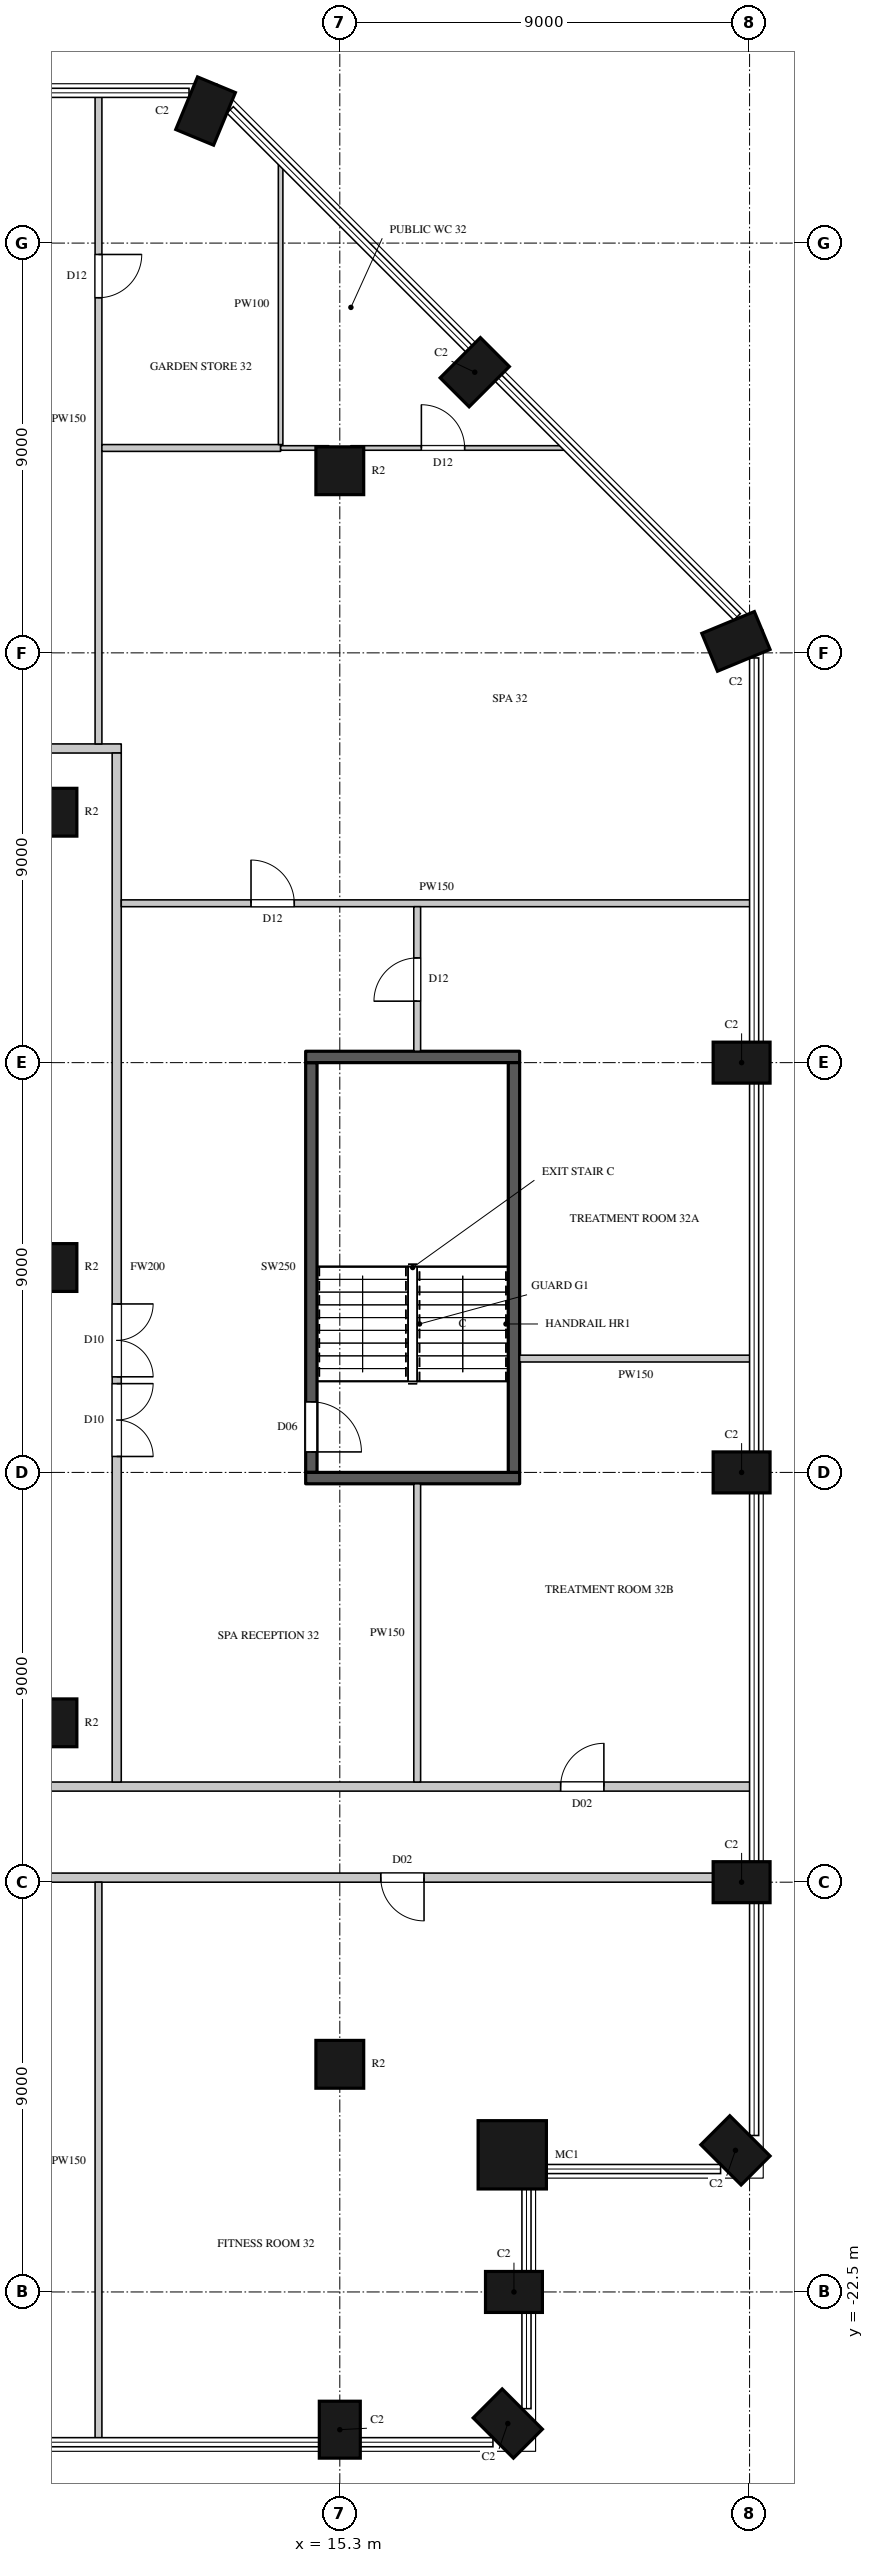
"""IFC4 building model, lengths in metres.
Left out: names, types, materials, properties, quantities, classifications, styles, units other than length and angle.
Written with IfcOpenShell. Run it as: python <this file> out.ifc"""

import sys

from ifc_helpers import new_model, si_unit, direction, frame, frame_2d, origin, origin_2d, place, context, subcontext, project, spatial, rectangle, circle, extrude, element, fill, save


model = new_model("IFC4")
c1 = context("Model", 3, precision=1e-05, world=origin(), true_north=direction((0.0, 1.0)))
c2 = subcontext(c1, "Body", "Model", "MODEL_VIEW")
j1 = project(units=[si_unit("LENGTHUNIT", "METRE"), si_unit("PLANEANGLEUNIT", "RADIAN")], contexts=[c1])
p1 = place(None, origin())
s1 = spatial("IfcSite", under=j1, at=p1, CompositionType="ELEMENT")
p2 = place(p1, origin())
s2 = spatial("IfcBuilding", under=s1, at=p2, CompositionType="ELEMENT")
p3 = place(p2, frame((0.0, 0.0, 145.5)))
s3 = spatial("IfcBuildingStorey", under=s2, at=p3, CompositionType="ELEMENT", Elevation=145.5)
for number, where, z_axis, x_axis in (
    (1, (15.3, -25.525, 0.0), (0.0, 0.0, 1.0), (1.0, 0.0, 0.0)),
    (2, (18.99, -25.39, 0.0), (0.0, 0.0, 1.0), (0.707, 0.707, 0.0)),
    (3, (19.125, -22.5, 0.0), (0.0, 0.0, 1.0), (0.0, 1.0, 0.0)),
):
    element("IfcColumn", number, at=place(p3, frame(where, z_axis=z_axis, x_axis=x_axis)), inside=s3, PredefinedType="COLUMN", context=c2, shape_type="SweptSolid", body=[
        extrude(rectangle(XDim=0.9, YDim=1.25, at=origin_2d()), origin(), (0.0, 0.0, 1.0), 7.0),
    ])
p4 = place(p3, frame((19.088, -19.488, 0.0), z_axis=(0.0, 0.0, 1.0), x_axis=(1.0, 0.0, 0.0)))
e4 = element("IfcColumn", 4, at=p4, inside=s3, PredefinedType="COLUMN", context=c2, shape_type="SweptSolid", body=[
    extrude(circle(Radius=0.75, at=origin_2d()), origin(), (0.0, 0.0, 1.0), 7.0),
])
for number, where, z_axis, x_axis in (
    (5, (23.99, -19.39, 0.0), (0.0, 0.0, 1.0), (0.707, 0.707, 0.0)),
    (6, (24.125, -13.5, 0.0), (0.0, 0.0, 1.0), (0.0, 1.0, 0.0)),
    (7, (24.125, -4.5, 0.0), (0.0, 0.0, 1.0), (0.0, 1.0, 0.0)),
    (8, (24.125, 4.5, 0.0), (0.0, 0.0, 1.0), (0.0, 1.0, 0.0)),
    (9, (24.0, 13.752, 0.0), (0.0, 0.0, 1.0), (-0.383, 0.924, 0.0)),
    (10, (18.264, 19.664, 0.0), (0.0, 0.0, 1.0), (-0.707, 0.707, 0.0)),
    (11, (12.352, 25.4, 0.0), (0.0, 0.0, 1.0), (-0.924, 0.383, 0.0)),
):
    element("IfcColumn", number, at=place(p3, frame(where, z_axis=z_axis, x_axis=x_axis)), inside=s3, PredefinedType="COLUMN", context=c2, shape_type="SweptSolid", body=[
        extrude(rectangle(XDim=0.9, YDim=1.25, at=origin_2d()), origin(), (0.0, 0.0, 1.0), 7.0),
    ])
for number, where, z_axis, x_axis in (
    (12, (15.3, -17.5, 0.0), (0.0, 0.0, 1.0), (1.0, 0.0, 0.0)),
    (13, (15.3, 17.5, 0.0), (0.0, 0.0, 1.0), (1.0, 0.0, 0.0)),
    (14, (9.0, -10.0, 0.0), (0.0, 0.0, 1.0), (1.0, 0.0, 0.0)),
    (15, (9.0, 0.0, 0.0), (0.0, 0.0, 1.0), (1.0, 0.0, 0.0)),
    (16, (9.0, 10.0, 0.0), (0.0, 0.0, 1.0), (1.0, 0.0, 0.0)),
):
    element("IfcColumn", number, at=place(p3, frame(where, z_axis=z_axis, x_axis=x_axis)), inside=s3, PredefinedType="COLUMN", context=c2, shape_type="SweptSolid", body=[
        extrude(circle(Radius=0.525, at=origin_2d()), origin(), (0.0, 0.0, 1.0), 7.0),
    ])
p5 = place(p3, frame((-8.3, -13.4, 0.0), z_axis=(0.0, 0.0, 1.0), x_axis=(1.0, 0.0, 0.0)))
e17 = element("IfcWall", 17, at=p5, inside=s3, PredefinedType="PARTITIONING", context=c2, shape_type="SweptSolid", body=[
    extrude(rectangle(XDim=31.8, YDim=0.2, at=frame_2d((15.9, 0.0))), origin(), (0.0, 0.0, 1.0), 6.7),
])
p6 = place(p5, frame((24.5, 0.0, 0.0)))
e18 = element("IfcOpeningElement", 18, at=p6, cuts=e17, PredefinedType="OPENING", context=c2, shape_type="SweptSolid", body=[
    extrude(rectangle(XDim=0.95, YDim=2.2, at=frame_2d((0.475, 1.1))), frame((0.0, 0.11, 0.0), z_axis=(0.0, -1.0, 0.0), x_axis=(1.0, 0.0, 0.0)), (0.0, 0.0, 1.0), 0.22),
])
p7 = place(p3, frame((-8.3, -11.4, 0.0), z_axis=(0.0, 0.0, 1.0), x_axis=(1.0, 0.0, 0.0)))
e19 = element("IfcWall", 19, at=p7, inside=s3, PredefinedType="PARTITIONING", context=c2, shape_type="SweptSolid", body=[
    extrude(rectangle(XDim=32.655, YDim=0.2, at=frame_2d((16.328, 0.0))), origin(), (0.0, 0.0, 1.0), 6.7),
])
p8 = place(p7, frame((9.6, 0.0, 0.0)))
e20 = element("IfcOpeningElement", 20, at=p8, cuts=e19, PredefinedType="OPENING", context=c2, shape_type="SweptSolid", body=[
    extrude(rectangle(XDim=1.5, YDim=2.2, at=frame_2d((0.75, 1.1))), frame((0.0, 0.11, 0.0), z_axis=(0.0, -1.0, 0.0), x_axis=(1.0, 0.0, 0.0)), (0.0, 0.0, 1.0), 0.22),
])
p9 = place(p7, frame((28.45, 0.0, 0.0)))
e21 = element("IfcOpeningElement", 21, at=p9, cuts=e19, PredefinedType="OPENING", context=c2, shape_type="SweptSolid", body=[
    extrude(rectangle(XDim=0.95, YDim=2.2, at=frame_2d((0.475, 1.1))), frame((0.0, 0.11, 0.0), z_axis=(0.0, -1.0, 0.0), x_axis=(1.0, 0.0, 0.0)), (0.0, 0.0, 1.0), 0.22),
])
p10 = place(p3, frame((-8.3, 11.4, 0.0), z_axis=(0.0, 0.0, 1.0), x_axis=(1.0, 0.0, 0.0)))
e22 = element("IfcWall", 22, at=p10, inside=s3, PredefinedType="PARTITIONING", context=c2, shape_type="SweptSolid", body=[
    extrude(rectangle(XDim=18.8, YDim=0.2, at=frame_2d((9.4, 0.0))), origin(), (0.0, 0.0, 1.0), 6.7),
])
p11 = place(p10, frame((7.4, 0.0, 0.0)))
e23 = element("IfcOpeningElement", 23, at=p11, cuts=e22, PredefinedType="OPENING", context=c2, shape_type="SweptSolid", body=[
    extrude(rectangle(XDim=1.6, YDim=2.4, at=frame_2d((0.8, 1.2))), frame((0.0, 0.11, 0.0), z_axis=(0.0, -1.0, 0.0), x_axis=(1.0, 0.0, 0.0)), (0.0, 0.0, 1.0), 0.22),
])
p12 = place(p3, frame((10.4, -11.3, 0.0), z_axis=(0.0, 0.0, 1.0), x_axis=(0.0, 1.0, 0.0)))
e24 = element("IfcWall", 24, at=p12, inside=s3, PredefinedType="PARTITIONING", context=c2, shape_type="SweptSolid", body=[
    extrude(rectangle(XDim=22.6, YDim=0.2, at=frame_2d((11.3, 0.0))), origin(), (0.0, 0.0, 1.0), 6.7),
])
p13 = place(p12, frame((8.9, 0.0, 0.0)))
e25 = element("IfcOpeningElement", 25, at=p13, cuts=e24, PredefinedType="OPENING", context=c2, shape_type="SweptSolid", body=[
    extrude(rectangle(XDim=1.6, YDim=2.4, at=frame_2d((0.8, 1.2))), frame((0.0, 0.11, 0.0), z_axis=(0.0, -1.0, 0.0), x_axis=(1.0, 0.0, 0.0)), (0.0, 0.0, 1.0), 0.22),
])
p14 = place(p12, frame((7.15, 0.0, 0.0)))
e26 = element("IfcOpeningElement", 26, at=p14, cuts=e24, PredefinedType="OPENING", context=c2, shape_type="SweptSolid", body=[
    extrude(rectangle(XDim=1.6, YDim=2.4, at=frame_2d((0.8, 1.2))), frame((0.0, 0.11, 0.0), z_axis=(0.0, -1.0, 0.0), x_axis=(1.0, 0.0, 0.0)), (0.0, 0.0, 1.0), 0.22),
])
p15 = place(p3, frame((10.0, -25.755, 0.0), z_axis=(0.0, 0.0, 1.0), x_axis=(0.0, 1.0, 0.0)))
e27 = element("IfcWall", 27, at=p15, inside=s3, PredefinedType="PARTITIONING", context=c2, shape_type="SweptSolid", body=[
    extrude(rectangle(XDim=12.255, YDim=0.15, at=frame_2d((6.127, 0.0))), origin(), (0.0, 0.0, 1.0), 6.7),
])
p16 = place(p3, frame((10.0, 11.5, 0.0), z_axis=(0.0, 0.0, 1.0), x_axis=(0.0, 1.0, 0.0)))
e28 = element("IfcWall", 28, at=p16, inside=s3, PredefinedType="PARTITIONING", context=c2, shape_type="SweptSolid", body=[
    extrude(rectangle(XDim=14.255, YDim=0.15, at=frame_2d((7.127, 0.0))), origin(), (0.0, 0.0, 1.0), 6.7),
])
p17 = place(p16, frame((9.8, 0.0, 0.0)))
e29 = element("IfcOpeningElement", 29, at=p17, cuts=e28, PredefinedType="OPENING", context=c2, shape_type="SweptSolid", body=[
    extrude(rectangle(XDim=0.95, YDim=2.2, at=frame_2d((0.475, 1.1))), frame((0.0, 0.085, 0.0), z_axis=(0.0, -1.0, 0.0), x_axis=(1.0, 0.0, 0.0)), (0.0, 0.0, 1.0), 0.17),
])
p18 = place(p3, frame((10.075, 18.0, 0.0), z_axis=(0.0, 0.0, 1.0), x_axis=(1.0, 0.0, 0.0)))
e30 = element("IfcWall", 30, at=p18, inside=s3, PredefinedType="PARTITIONING", context=c2, shape_type="SweptSolid", body=[
    extrude(rectangle(XDim=3.925, YDim=0.15, at=frame_2d((1.962, 0.0))), origin(), (0.0, 0.0, 1.0), 6.7),
])
p19 = place(p3, frame((10.5, 8.0, 0.0), z_axis=(0.0, 0.0, 1.0), x_axis=(1.0, 0.0, 0.0)))
e31 = element("IfcWall", 31, at=p19, inside=s3, PredefinedType="PARTITIONING", context=c2, shape_type="SweptSolid", body=[
    extrude(rectangle(XDim=13.855, YDim=0.15, at=frame_2d((6.927, 0.0))), origin(), (0.0, 0.0, 1.0), 6.7),
])
p20 = place(p19, frame((2.85, 0.0, 0.0)))
e32 = element("IfcOpeningElement", 32, at=p20, cuts=e31, PredefinedType="OPENING", context=c2, shape_type="SweptSolid", body=[
    extrude(rectangle(XDim=0.95, YDim=2.2, at=frame_2d((0.475, 1.1))), frame((0.0, 0.085, 0.0), z_axis=(0.0, -1.0, 0.0), x_axis=(1.0, 0.0, 0.0)), (0.0, 0.0, 1.0), 0.17),
])
p21 = place(p3, frame((17.0, -11.3, 0.0), z_axis=(0.0, 0.0, 1.0), x_axis=(0.0, 1.0, 0.0)))
e33 = element("IfcWall", 33, at=p21, inside=s3, PredefinedType="PARTITIONING", context=c2, shape_type="SweptSolid", body=[
    extrude(rectangle(XDim=6.55, YDim=0.15, at=frame_2d((3.275, 0.0))), origin(), (0.0, 0.0, 1.0), 6.7),
])
p22 = place(p3, frame((17.0, 4.75, 0.0), z_axis=(0.0, 0.0, 1.0), x_axis=(0.0, 1.0, 0.0)))
e34 = element("IfcWall", 34, at=p22, inside=s3, PredefinedType="PARTITIONING", context=c2, shape_type="SweptSolid", body=[
    extrude(rectangle(XDim=3.175, YDim=0.15, at=frame_2d((1.587, 0.0))), origin(), (0.0, 0.0, 1.0), 6.7),
])
p23 = place(p22, frame((1.1, 0.0, 0.0)))
e35 = element("IfcOpeningElement", 35, at=p23, cuts=e34, PredefinedType="OPENING", context=c2, shape_type="SweptSolid", body=[
    extrude(rectangle(XDim=0.95, YDim=2.2, at=frame_2d((0.475, 1.1))), frame((0.0, 0.085, 0.0), z_axis=(0.0, -1.0, 0.0), x_axis=(1.0, 0.0, 0.0)), (0.0, 0.0, 1.0), 0.17),
])
p24 = place(p3, frame((19.25, -2.0, 0.0), z_axis=(0.0, 0.0, 1.0), x_axis=(1.0, 0.0, 0.0)))
e36 = element("IfcWall", 36, at=p24, inside=s3, PredefinedType="PARTITIONING", context=c2, shape_type="SweptSolid", body=[
    extrude(rectangle(XDim=5.105, YDim=0.15, at=frame_2d((2.552, 0.0))), origin(), (0.0, 0.0, 1.0), 6.7),
])
p25 = place(p3, frame((14.675, -4.5, 0.0), z_axis=(0.0, 0.0, 1.0), x_axis=(0.0, 1.0, 0.0)))
e37 = element("IfcWall", 37, at=p25, inside=s3, PredefinedType="SHEAR", context=c2, shape_type="SweptSolid", body=[
    extrude(rectangle(XDim=9.0, YDim=0.25, at=frame_2d((4.5, 0.0))), origin(), (0.0, 0.0, 1.0), 6.7),
])
p26 = place(p25, frame((0.45, 0.0, 0.0)))
e38 = element("IfcOpeningElement", 38, at=p26, cuts=e37, PredefinedType="OPENING", context=c2, shape_type="SweptSolid", body=[
    extrude(rectangle(XDim=1.1, YDim=2.2, at=frame_2d((0.55, 1.1))), frame((0.0, 0.135, 0.0), z_axis=(0.0, -1.0, 0.0), x_axis=(1.0, 0.0, 0.0)), (0.0, 0.0, 1.0), 0.27),
])
for number, where, z_axis, x_axis in (
    (39, (14.55, -4.625, 0.0), (0.0, 0.0, 1.0), (1.0, 0.0, 0.0)),
    (40, (14.55, 4.625, 0.0), (0.0, 0.0, 1.0), (1.0, 0.0, 0.0)),
):
    element("IfcWall", number, at=place(p3, frame(where, z_axis=z_axis, x_axis=x_axis)), inside=s3, PredefinedType="SHEAR", context=c2, shape_type="SweptSolid", body=[
        extrude(rectangle(XDim=4.7, YDim=0.25, at=frame_2d((2.35, 0.0))), origin(), (0.0, 0.0, 1.0), 6.7),
    ])
p27 = place(p3, frame((19.125, -4.5, 0.0), z_axis=(0.0, 0.0, 1.0), x_axis=(0.0, 1.0, 0.0)))
e41 = element("IfcWall", 41, at=p27, inside=s3, PredefinedType="SHEAR", context=c2, shape_type="SweptSolid", body=[
    extrude(rectangle(XDim=9.0, YDim=0.25, at=frame_2d((4.5, 0.0))), origin(), (0.0, 0.0, 1.0), 6.7),
])
p28 = place(p3, frame((14.0, 18.0, 0.0), z_axis=(0.0, 0.0, 1.0), x_axis=(1.0, 0.0, 0.0)))
e42 = element("IfcWall", 42, at=p28, inside=s3, PredefinedType="PARTITIONING", context=c2, shape_type="SweptSolid", body=[
    extrude(rectangle(XDim=1.058, YDim=0.1, at=frame_2d((0.529, 0.0))), origin(), (0.0, 0.0, 1.0), 6.7),
])
p29 = place(p3, frame((15.542, 18.0, 0.0), z_axis=(0.0, 0.0, 1.0), x_axis=(1.0, 0.0, 0.0)))
e43 = element("IfcWall", 43, at=p29, inside=s3, PredefinedType="PARTITIONING", context=c2, shape_type="SweptSolid", body=[
    extrude(rectangle(XDim=4.712, YDim=0.1, at=frame_2d((2.356, 0.0))), origin(), (0.0, 0.0, 1.0), 6.7),
])
p30 = place(p29, frame((1.55, 0.0, 0.0)))
e44 = element("IfcOpeningElement", 44, at=p30, cuts=e43, PredefinedType="OPENING", context=c2, shape_type="SweptSolid", body=[
    extrude(rectangle(XDim=0.95, YDim=2.2, at=frame_2d((0.475, 1.1))), frame((0.0, 0.06, 0.0), z_axis=(0.0, -1.0, 0.0), x_axis=(1.0, 0.0, 0.0)), (0.0, 0.0, 1.0), 0.12),
])
p31 = place(p3, frame((14.0, 18.075, 0.0), z_axis=(0.0, 0.0, 1.0), x_axis=(0.0, 1.0, 0.0)))
e45 = element("IfcWall", 45, at=p31, inside=s3, PredefinedType="PARTITIONING", context=c2, shape_type="SweptSolid", body=[
    extrude(rectangle(XDim=6.178, YDim=0.1, at=frame_2d((3.089, 0.0))), origin(), (0.0, 0.0, 1.0), 6.7),
])
p32 = place(p13, origin())
e46 = element("IfcDoor", 46, at=p32, inside=s3, OperationType="DOUBLE_DOOR_SINGLE_SWING", PredefinedType="DOOR", context=c2, shape_type="SweptSolid", body=[
    extrude(rectangle(XDim=1.6, YDim=2.4, at=frame_2d((0.8, 1.2))), frame((0.0, 0.025, 0.0), z_axis=(0.0, -1.0, 0.0), x_axis=(1.0, 0.0, 0.0)), (0.0, 0.0, 1.0), 0.05),
])
fill(e25, e46)
p33 = place(p14, origin())
e47 = element("IfcDoor", 47, at=p33, inside=s3, OperationType="DOUBLE_DOOR_SINGLE_SWING", PredefinedType="DOOR", context=c2, shape_type="SweptSolid", body=[
    extrude(rectangle(XDim=1.6, YDim=2.4, at=frame_2d((0.8, 1.2))), frame((0.0, 0.025, 0.0), z_axis=(0.0, -1.0, 0.0), x_axis=(1.0, 0.0, 0.0)), (0.0, 0.0, 1.0), 0.05),
])
fill(e26, e47)
p34 = place(p17, origin())
e48 = element("IfcDoor", 48, at=p34, inside=s3, OperationType="SINGLE_SWING_LEFT", PredefinedType="DOOR", context=c2, shape_type="SweptSolid", body=[
    extrude(rectangle(XDim=0.95, YDim=2.2, at=frame_2d((0.475, 1.1))), frame((0.0, 0.025, 0.0), z_axis=(0.0, -1.0, 0.0), x_axis=(1.0, 0.0, 0.0)), (0.0, 0.0, 1.0), 0.05),
])
fill(e29, e48)
p35 = place(p30, origin())
e49 = element("IfcDoor", 49, at=p35, inside=s3, OperationType="SINGLE_SWING_LEFT", PredefinedType="DOOR", context=c2, shape_type="SweptSolid", body=[
    extrude(rectangle(XDim=0.95, YDim=2.2, at=frame_2d((0.475, 1.1))), frame((0.0, 0.025, 0.0), z_axis=(0.0, -1.0, 0.0), x_axis=(1.0, 0.0, 0.0)), (0.0, 0.0, 1.0), 0.05),
])
fill(e44, e49)
p36 = place(p20, origin())
e50 = element("IfcDoor", 50, at=p36, inside=s3, OperationType="SINGLE_SWING_LEFT", PredefinedType="DOOR", context=c2, shape_type="SweptSolid", body=[
    extrude(rectangle(XDim=0.95, YDim=2.2, at=frame_2d((0.475, 1.1))), frame((0.0, 0.025, 0.0), z_axis=(0.0, -1.0, 0.0), x_axis=(1.0, 0.0, 0.0)), (0.0, 0.0, 1.0), 0.05),
])
fill(e32, e50)
p37 = place(p23, origin())
e51 = element("IfcDoor", 51, at=p37, inside=s3, OperationType="SINGLE_SWING_LEFT", PredefinedType="DOOR", context=c2, shape_type="SweptSolid", body=[
    extrude(rectangle(XDim=0.95, YDim=2.2, at=frame_2d((0.475, 1.1))), frame((0.0, 0.025, 0.0), z_axis=(0.0, -1.0, 0.0), x_axis=(1.0, 0.0, 0.0)), (0.0, 0.0, 1.0), 0.05),
])
fill(e35, e51)
p38 = place(p9, origin())
e52 = element("IfcDoor", 52, at=p38, inside=s3, OperationType="SINGLE_SWING_RIGHT", PredefinedType="DOOR", context=c2, shape_type="SweptSolid", body=[
    extrude(rectangle(XDim=0.95, YDim=2.2, at=frame_2d((0.475, 1.1))), frame((0.0, 0.025, 0.0), z_axis=(0.0, -1.0, 0.0), x_axis=(1.0, 0.0, 0.0)), (0.0, 0.0, 1.0), 0.05),
])
fill(e21, e52)
p39 = place(p6, origin())
e53 = element("IfcDoor", 53, at=p39, inside=s3, OperationType="SINGLE_SWING_LEFT", PredefinedType="DOOR", context=c2, shape_type="SweptSolid", body=[
    extrude(rectangle(XDim=0.95, YDim=2.2, at=frame_2d((0.475, 1.1))), frame((0.0, 0.025, 0.0), z_axis=(0.0, -1.0, 0.0), x_axis=(1.0, 0.0, 0.0)), (0.0, 0.0, 1.0), 0.05),
])
fill(e18, e53)
p40 = place(p26, origin())
e54 = element("IfcDoor", 54, at=p40, inside=s3, OperationType="SINGLE_SWING_RIGHT", PredefinedType="DOOR", context=c2, shape_type="SweptSolid", body=[
    extrude(rectangle(XDim=1.1, YDim=2.2, at=frame_2d((0.55, 1.1))), frame((0.0, 0.025, 0.0), z_axis=(0.0, -1.0, 0.0), x_axis=(1.0, 0.0, 0.0)), (0.0, 0.0, 1.0), 0.05),
])
fill(e38, e54)
save(model, sys.argv[1])
